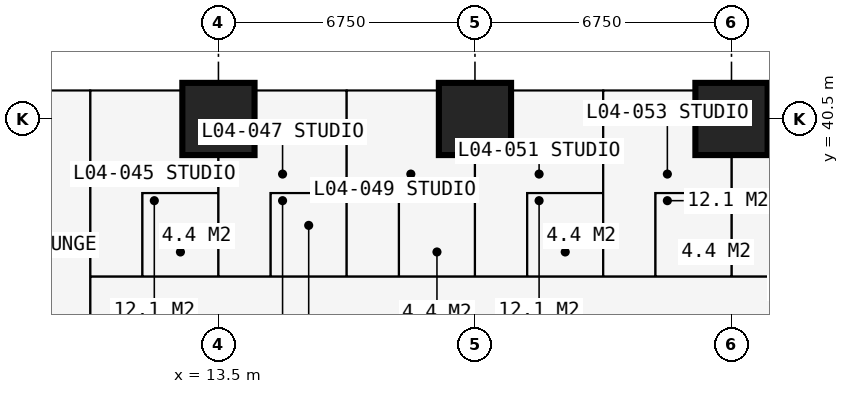
"""IFC4 building model, lengths in metres.
Left out: names, types, materials, properties, quantities, classifications, styles, units other than length and angle.
Written with IfcOpenShell. Run it as: python <this file> out.ifc"""

import sys

from ifc_helpers import new_model, si_unit, direction, frame, frame_2d, origin, origin_2d, place, context, subcontext, project, spatial, rectangle, extrude, element, fill, save


model = new_model("IFC4")
c1 = context("Model", 3, precision=1e-05, world=origin(), true_north=direction((0.0, 1.0)))
c2 = subcontext(c1, "Body", "Model", "MODEL_VIEW")
j1 = project(units=[si_unit("LENGTHUNIT", "METRE"), si_unit("PLANEANGLEUNIT", "RADIAN")], contexts=[c1])
p1 = place(None, origin())
s1 = spatial("IfcSite", under=j1, at=p1, CompositionType="ELEMENT")
p2 = place(p1, origin())
s2 = spatial("IfcBuilding", under=s1, at=p2, CompositionType="ELEMENT")
p3 = place(p2, frame((0.0, 0.0, 18.0)))
s3 = spatial("IfcBuildingStorey", under=s2, at=p3, CompositionType="ELEMENT", Elevation=18.0)
for number, where, z_axis, x_axis in (
    (1, (13.5, 40.5, 0.0), (0.0, 0.0, 1.0), (1.0, 0.0, 0.0)),
    (2, (20.25, 40.5, 0.0), (0.0, 0.0, 1.0), (1.0, 0.0, 0.0)),
    (3, (27.0, 40.5, 0.0), (0.0, 0.0, 1.0), (1.0, 0.0, 0.0)),
):
    element("IfcColumn", number, at=place(p3, frame(where, z_axis=z_axis, x_axis=x_axis)), inside=s3, PredefinedType="COLUMN", context=c2, shape_type="SweptSolid", body=[
        extrude(rectangle(XDim=1.9, YDim=1.9, at=origin_2d()), origin(), (0.0, 0.0, 1.0), 3.6),
    ])
p4 = place(p3, frame((13.5, 41.25, 0.0), z_axis=(0.0, 0.0, 1.0), x_axis=(1.0, 0.0, 0.0)))
e4 = element("IfcWall", 4, at=p4, inside=s3, PredefinedType="SOLIDWALL", context=c2, shape_type="SweptSolid", body=[
    extrude(rectangle(XDim=6.75, YDim=0.15, at=frame_2d((3.375, 0.0))), origin(), (0.0, 0.0, 1.0), 3.375),
])
p5 = place(p4, frame((0.996, 0.0, 0.0)))
e5 = element("IfcOpeningElement", 5, at=p5, cuts=e4, PredefinedType="OPENING", context=c2, shape_type="SweptSolid", body=[
    extrude(rectangle(XDim=1.0, YDim=2.2, at=frame_2d((0.5, 1.1))), frame((0.0, 0.085, 0.0), z_axis=(0.0, -1.0, 0.0), x_axis=(1.0, 0.0, 0.0)), (0.0, 0.0, 1.0), 0.17),
])
p6 = place(p4, frame((2.042, 0.0, 0.9)))
e6 = element("IfcOpeningElement", 6, at=p6, cuts=e4, PredefinedType="OPENING", context=c2, shape_type="SweptSolid", body=[
    extrude(rectangle(XDim=1.2, YDim=1.8, at=frame_2d((0.6, 0.9))), frame((0.0, 0.085, 0.0), z_axis=(0.0, -1.0, 0.0), x_axis=(1.0, 0.0, 0.0)), (0.0, 0.0, 1.0), 0.17),
])
p7 = place(p4, frame((4.754, 0.0, 0.0)))
e7 = element("IfcOpeningElement", 7, at=p7, cuts=e4, PredefinedType="OPENING", context=c2, shape_type="SweptSolid", body=[
    extrude(rectangle(XDim=1.0, YDim=2.2, at=frame_2d((0.5, 1.1))), frame((0.0, 0.085, 0.0), z_axis=(0.0, -1.0, 0.0), x_axis=(1.0, 0.0, 0.0)), (0.0, 0.0, 1.0), 0.17),
])
p8 = place(p4, frame((3.508, 0.0, 0.9)))
e8 = element("IfcOpeningElement", 8, at=p8, cuts=e4, PredefinedType="OPENING", context=c2, shape_type="SweptSolid", body=[
    extrude(rectangle(XDim=1.2, YDim=1.8, at=frame_2d((0.6, 0.9))), frame((0.0, 0.085, 0.0), z_axis=(0.0, -1.0, 0.0), x_axis=(1.0, 0.0, 0.0)), (0.0, 0.0, 1.0), 0.17),
])
p9 = place(p3, frame((16.875, 41.35, 0.0), z_axis=(0.0, 0.0, 1.0), x_axis=(0.0, 1.0, 0.0)))
e9 = element("IfcWall", 9, at=p9, inside=s3, PredefinedType="USERDEFINED", context=c2, shape_type="SweptSolid", body=[
    extrude(rectangle(XDim=2.2, YDim=1.0, at=frame_2d((1.1, 0.0))), origin(), (0.0, 0.0, 1.0), 0.9),
])
p10 = place(p3, frame((10.125, 30.375, 0.0), z_axis=(0.0, 0.0, 1.0), x_axis=(0.0, 1.0, 0.0)))
e10 = element("IfcWall", 10, at=p10, inside=s3, PredefinedType="PARTITIONING", context=c2, shape_type="SweptSolid", body=[
    extrude(rectangle(XDim=10.859, YDim=0.15, at=frame_2d((5.429, 0.0))), origin(), (0.0, 0.0, 1.0), 3.375),
])
p11 = place(p10, frame((4.725, 0.0, 0.0)))
e11 = element("IfcOpeningElement", 11, at=p11, cuts=e10, PredefinedType="OPENING", context=c2, shape_type="SweptSolid", body=[
    extrude(rectangle(XDim=1.0, YDim=2.2, at=frame_2d((0.5, 1.1))), frame((0.0, 0.085, 0.0), z_axis=(0.0, -1.0, 0.0), x_axis=(1.0, 0.0, 0.0)), (0.0, 0.0, 1.0), 0.17),
])
p12 = place(p3, frame((10.125, 36.35, 0.0), z_axis=(0.0, 0.0, 1.0), x_axis=(1.0, 0.0, 0.0)))
e12 = element("IfcWall", 12, at=p12, inside=s3, PredefinedType="PARTITIONING", context=c2, shape_type="SweptSolid", body=[
    extrude(rectangle(XDim=23.625, YDim=0.1, at=frame_2d((11.812, 0.0))), origin(), (0.0, 0.0, 1.0), 3.375),
])
p13 = place(p12, frame((0.2, 0.0, 0.0)))
e13 = element("IfcOpeningElement", 13, at=p13, cuts=e12, PredefinedType="OPENING", context=c2, shape_type="SweptSolid", body=[
    extrude(rectangle(XDim=0.95, YDim=2.2, at=frame_2d((0.475, 1.1))), frame((0.0, 0.06, 0.0), z_axis=(0.0, -1.0, 0.0), x_axis=(1.0, 0.0, 0.0)), (0.0, 0.0, 1.0), 0.12),
])
p14 = place(p12, frame((3.625, 0.0, 0.0)))
e14 = element("IfcOpeningElement", 14, at=p14, cuts=e12, PredefinedType="OPENING", context=c2, shape_type="SweptSolid", body=[
    extrude(rectangle(XDim=0.95, YDim=2.2, at=frame_2d((0.475, 1.1))), frame((0.0, 0.06, 0.0), z_axis=(0.0, -1.0, 0.0), x_axis=(1.0, 0.0, 0.0)), (0.0, 0.0, 1.0), 0.12),
])
p15 = place(p12, frame((7.0, 0.0, 0.0)))
e15 = element("IfcOpeningElement", 15, at=p15, cuts=e12, PredefinedType="OPENING", context=c2, shape_type="SweptSolid", body=[
    extrude(rectangle(XDim=0.95, YDim=2.2, at=frame_2d((0.475, 1.1))), frame((0.0, 0.06, 0.0), z_axis=(0.0, -1.0, 0.0), x_axis=(1.0, 0.0, 0.0)), (0.0, 0.0, 1.0), 0.12),
])
p16 = place(p12, frame((10.375, 0.0, 0.0)))
e16 = element("IfcOpeningElement", 16, at=p16, cuts=e12, PredefinedType="OPENING", context=c2, shape_type="SweptSolid", body=[
    extrude(rectangle(XDim=0.95, YDim=2.2, at=frame_2d((0.475, 1.1))), frame((0.0, 0.06, 0.0), z_axis=(0.0, -1.0, 0.0), x_axis=(1.0, 0.0, 0.0)), (0.0, 0.0, 1.0), 0.12),
])
p17 = place(p12, frame((13.75, 0.0, 0.0)))
e17 = element("IfcOpeningElement", 17, at=p17, cuts=e12, PredefinedType="OPENING", context=c2, shape_type="SweptSolid", body=[
    extrude(rectangle(XDim=0.95, YDim=2.2, at=frame_2d((0.475, 1.1))), frame((0.0, 0.06, 0.0), z_axis=(0.0, -1.0, 0.0), x_axis=(1.0, 0.0, 0.0)), (0.0, 0.0, 1.0), 0.12),
])
p18 = place(p3, frame((11.5, 36.35, 0.0), z_axis=(0.0, 0.0, 1.0), x_axis=(0.0, 1.0, 0.0)))
e18 = element("IfcWall", 18, at=p18, inside=s3, PredefinedType="PARTITIONING", context=c2, shape_type="SweptSolid", body=[
    extrude(rectangle(XDim=2.2, YDim=0.1, at=frame_2d((1.1, 0.0))), origin(), (0.0, 0.0, 1.0), 3.375),
])
p19 = place(p18, frame((0.65, 0.0, 0.0)))
e19 = element("IfcOpeningElement", 19, at=p19, cuts=e18, PredefinedType="OPENING", context=c2, shape_type="SweptSolid", body=[
    extrude(rectangle(XDim=0.9, YDim=2.2, at=frame_2d((0.45, 1.1))), frame((0.0, 0.06, 0.0), z_axis=(0.0, -1.0, 0.0), x_axis=(1.0, 0.0, 0.0)), (0.0, 0.0, 1.0), 0.12),
])
p20 = place(p3, frame((11.5, 38.55, 0.0), z_axis=(0.0, 0.0, 1.0), x_axis=(1.0, 0.0, 0.0)))
e20 = element("IfcWall", 20, at=p20, inside=s3, PredefinedType="PARTITIONING", context=c2, shape_type="SweptSolid", body=[
    extrude(rectangle(XDim=2.0, YDim=0.1, at=frame_2d((1.0, 0.0))), origin(), (0.0, 0.0, 1.0), 3.375),
])
p21 = place(p3, frame((13.5, 36.35, 0.0), z_axis=(0.0, 0.0, 1.0), x_axis=(0.0, 1.0, 0.0)))
e21 = element("IfcWall", 21, at=p21, inside=s3, PredefinedType="PARTITIONING", context=c2, shape_type="SweptSolid", body=[
    extrude(rectangle(XDim=4.884, YDim=0.175, at=frame_2d((2.442, 0.0))), origin(), (0.0, 0.0, 1.0), 2.877),
])
p22 = place(p3, frame((14.875, 36.35, 0.0), z_axis=(0.0, 0.0, 1.0), x_axis=(0.0, 1.0, 0.0)))
e22 = element("IfcWall", 22, at=p22, inside=s3, PredefinedType="PARTITIONING", context=c2, shape_type="SweptSolid", body=[
    extrude(rectangle(XDim=2.2, YDim=0.1, at=frame_2d((1.1, 0.0))), origin(), (0.0, 0.0, 1.0), 3.375),
])
p23 = place(p22, frame((0.65, 0.0, 0.0)))
e23 = element("IfcOpeningElement", 23, at=p23, cuts=e22, PredefinedType="OPENING", context=c2, shape_type="SweptSolid", body=[
    extrude(rectangle(XDim=0.9, YDim=2.2, at=frame_2d((0.45, 1.1))), frame((0.0, 0.06, 0.0), z_axis=(0.0, -1.0, 0.0), x_axis=(1.0, 0.0, 0.0)), (0.0, 0.0, 1.0), 0.12),
])
p24 = place(p3, frame((14.875, 38.55, 0.0), z_axis=(0.0, 0.0, 1.0), x_axis=(1.0, 0.0, 0.0)))
e24 = element("IfcWall", 24, at=p24, inside=s3, PredefinedType="PARTITIONING", context=c2, shape_type="SweptSolid", body=[
    extrude(rectangle(XDim=2.0, YDim=0.1, at=frame_2d((1.0, 0.0))), origin(), (0.0, 0.0, 1.0), 3.375),
])
p25 = place(p3, frame((16.875, 36.35, 0.0), z_axis=(0.0, 0.0, 1.0), x_axis=(0.0, 1.0, 0.0)))
e25 = element("IfcWall", 25, at=p25, inside=s3, PredefinedType="PARTITIONING", context=c2, shape_type="SweptSolid", body=[
    extrude(rectangle(XDim=4.884, YDim=0.175, at=frame_2d((2.442, 0.0))), origin(), (0.0, 0.0, 1.0), 3.375),
])
p26 = place(p3, frame((18.25, 36.35, 0.0), z_axis=(0.0, 0.0, 1.0), x_axis=(0.0, 1.0, 0.0)))
e26 = element("IfcWall", 26, at=p26, inside=s3, PredefinedType="PARTITIONING", context=c2, shape_type="SweptSolid", body=[
    extrude(rectangle(XDim=2.2, YDim=0.1, at=frame_2d((1.1, 0.0))), origin(), (0.0, 0.0, 1.0), 3.375),
])
p27 = place(p26, frame((0.65, 0.0, 0.0)))
e27 = element("IfcOpeningElement", 27, at=p27, cuts=e26, PredefinedType="OPENING", context=c2, shape_type="SweptSolid", body=[
    extrude(rectangle(XDim=0.9, YDim=2.2, at=frame_2d((0.45, 1.1))), frame((0.0, 0.06, 0.0), z_axis=(0.0, -1.0, 0.0), x_axis=(1.0, 0.0, 0.0)), (0.0, 0.0, 1.0), 0.12),
])
p28 = place(p3, frame((18.25, 38.55, 0.0), z_axis=(0.0, 0.0, 1.0), x_axis=(1.0, 0.0, 0.0)))
e28 = element("IfcWall", 28, at=p28, inside=s3, PredefinedType="PARTITIONING", context=c2, shape_type="SweptSolid", body=[
    extrude(rectangle(XDim=2.0, YDim=0.1, at=frame_2d((1.0, 0.0))), origin(), (0.0, 0.0, 1.0), 3.375),
])
p29 = place(p3, frame((20.25, 36.35, 0.0), z_axis=(0.0, 0.0, 1.0), x_axis=(0.0, 1.0, 0.0)))
e29 = element("IfcWall", 29, at=p29, inside=s3, PredefinedType="PARTITIONING", context=c2, shape_type="SweptSolid", body=[
    extrude(rectangle(XDim=4.884, YDim=0.175, at=frame_2d((2.442, 0.0))), origin(), (0.0, 0.0, 1.0), 2.61),
])
p30 = place(p3, frame((21.625, 36.35, 0.0), z_axis=(0.0, 0.0, 1.0), x_axis=(0.0, 1.0, 0.0)))
e30 = element("IfcWall", 30, at=p30, inside=s3, PredefinedType="PARTITIONING", context=c2, shape_type="SweptSolid", body=[
    extrude(rectangle(XDim=2.2, YDim=0.1, at=frame_2d((1.1, 0.0))), origin(), (0.0, 0.0, 1.0), 3.375),
])
p31 = place(p30, frame((0.65, 0.0, 0.0)))
e31 = element("IfcOpeningElement", 31, at=p31, cuts=e30, PredefinedType="OPENING", context=c2, shape_type="SweptSolid", body=[
    extrude(rectangle(XDim=0.9, YDim=2.2, at=frame_2d((0.45, 1.1))), frame((0.0, 0.06, 0.0), z_axis=(0.0, -1.0, 0.0), x_axis=(1.0, 0.0, 0.0)), (0.0, 0.0, 1.0), 0.12),
])
p32 = place(p3, frame((21.625, 38.55, 0.0), z_axis=(0.0, 0.0, 1.0), x_axis=(1.0, 0.0, 0.0)))
e32 = element("IfcWall", 32, at=p32, inside=s3, PredefinedType="PARTITIONING", context=c2, shape_type="SweptSolid", body=[
    extrude(rectangle(XDim=2.0, YDim=0.1, at=frame_2d((1.0, 0.0))), origin(), (0.0, 0.0, 1.0), 3.375),
])
p33 = place(p3, frame((23.625, 36.35, 0.0), z_axis=(0.0, 0.0, 1.0), x_axis=(0.0, 1.0, 0.0)))
e33 = element("IfcWall", 33, at=p33, inside=s3, PredefinedType="PARTITIONING", context=c2, shape_type="SweptSolid", body=[
    extrude(rectangle(XDim=4.884, YDim=0.175, at=frame_2d((2.442, 0.0))), origin(), (0.0, 0.0, 1.0), 3.375),
])
p34 = place(p3, frame((25.0, 36.35, 0.0), z_axis=(0.0, 0.0, 1.0), x_axis=(0.0, 1.0, 0.0)))
e34 = element("IfcWall", 34, at=p34, inside=s3, PredefinedType="PARTITIONING", context=c2, shape_type="SweptSolid", body=[
    extrude(rectangle(XDim=2.2, YDim=0.1, at=frame_2d((1.1, 0.0))), origin(), (0.0, 0.0, 1.0), 3.375),
])
p35 = place(p34, frame((0.65, 0.0, 0.0)))
e35 = element("IfcOpeningElement", 35, at=p35, cuts=e34, PredefinedType="OPENING", context=c2, shape_type="SweptSolid", body=[
    extrude(rectangle(XDim=0.9, YDim=2.2, at=frame_2d((0.45, 1.1))), frame((0.0, 0.06, 0.0), z_axis=(0.0, -1.0, 0.0), x_axis=(1.0, 0.0, 0.0)), (0.0, 0.0, 1.0), 0.12),
])
p36 = place(p3, frame((25.0, 38.55, 0.0), z_axis=(0.0, 0.0, 1.0), x_axis=(1.0, 0.0, 0.0)))
e36 = element("IfcWall", 36, at=p36, inside=s3, PredefinedType="PARTITIONING", context=c2, shape_type="SweptSolid", body=[
    extrude(rectangle(XDim=2.0, YDim=0.1, at=frame_2d((1.0, 0.0))), origin(), (0.0, 0.0, 1.0), 3.375),
])
p37 = place(p3, frame((27.0, 36.35, 0.0), z_axis=(0.0, 0.0, 1.0), x_axis=(0.0, 1.0, 0.0)))
e37 = element("IfcWall", 37, at=p37, inside=s3, PredefinedType="PARTITIONING", context=c2, shape_type="SweptSolid", body=[
    extrude(rectangle(XDim=4.884, YDim=0.15, at=frame_2d((2.442, 0.0))), origin(), (0.0, 0.0, 1.0), 2.61),
])
p38 = place(p5, origin())
e38 = element("IfcDoor", 38, at=p38, inside=s3, OperationType="SINGLE_SWING_LEFT", PredefinedType="DOOR", context=c2, shape_type="SweptSolid", body=[
    extrude(rectangle(XDim=1.0, YDim=2.2, at=frame_2d((0.5, 1.1))), frame((0.0, 0.025, 0.0), z_axis=(0.0, -1.0, 0.0), x_axis=(1.0, 0.0, 0.0)), (0.0, 0.0, 1.0), 0.05),
])
fill(e5, e38)
p39 = place(p6, origin())
e39 = element("IfcWindow", 39, at=p39, inside=s3, PartitioningType="SINGLE_PANEL", PredefinedType="WINDOW", context=c2, shape_type="SweptSolid", body=[
    extrude(rectangle(XDim=1.2, YDim=1.8, at=frame_2d((0.6, 0.9))), frame((0.0, 0.03, 0.0), z_axis=(0.0, -1.0, 0.0), x_axis=(1.0, 0.0, 0.0)), (0.0, 0.0, 1.0), 0.06),
])
fill(e6, e39)
p40 = place(p7, origin())
e40 = element("IfcDoor", 40, at=p40, inside=s3, OperationType="SINGLE_SWING_RIGHT", PredefinedType="DOOR", context=c2, shape_type="SweptSolid", body=[
    extrude(rectangle(XDim=1.0, YDim=2.2, at=frame_2d((0.5, 1.1))), frame((0.0, 0.025, 0.0), z_axis=(0.0, -1.0, 0.0), x_axis=(1.0, 0.0, 0.0)), (0.0, 0.0, 1.0), 0.05),
])
fill(e7, e40)
p41 = place(p8, origin())
e41 = element("IfcWindow", 41, at=p41, inside=s3, PartitioningType="SINGLE_PANEL", PredefinedType="WINDOW", context=c2, shape_type="SweptSolid", body=[
    extrude(rectangle(XDim=1.2, YDim=1.8, at=frame_2d((0.6, 0.9))), frame((0.0, 0.03, 0.0), z_axis=(0.0, -1.0, 0.0), x_axis=(1.0, 0.0, 0.0)), (0.0, 0.0, 1.0), 0.06),
])
fill(e8, e41)
p42 = place(p13, origin())
e42 = element("IfcDoor", 42, at=p42, inside=s3, OperationType="SINGLE_SWING_LEFT", PredefinedType="DOOR", context=c2, shape_type="SweptSolid", body=[
    extrude(rectangle(XDim=0.95, YDim=2.2, at=frame_2d((0.475, 1.1))), frame((0.0, 0.025, 0.0), z_axis=(0.0, -1.0, 0.0), x_axis=(1.0, 0.0, 0.0)), (0.0, 0.0, 1.0), 0.05),
])
fill(e13, e42)
p43 = place(p19, origin())
e43 = element("IfcDoor", 43, at=p43, inside=s3, OperationType="SINGLE_SWING_RIGHT", PredefinedType="DOOR", context=c2, shape_type="SweptSolid", body=[
    extrude(rectangle(XDim=0.9, YDim=2.2, at=frame_2d((0.45, 1.1))), frame((0.0, 0.025, 0.0), z_axis=(0.0, -1.0, 0.0), x_axis=(1.0, 0.0, 0.0)), (0.0, 0.0, 1.0), 0.05),
])
fill(e19, e43)
p44 = place(p14, origin())
e44 = element("IfcDoor", 44, at=p44, inside=s3, OperationType="SINGLE_SWING_LEFT", PredefinedType="DOOR", context=c2, shape_type="SweptSolid", body=[
    extrude(rectangle(XDim=0.95, YDim=2.2, at=frame_2d((0.475, 1.1))), frame((0.0, 0.025, 0.0), z_axis=(0.0, -1.0, 0.0), x_axis=(1.0, 0.0, 0.0)), (0.0, 0.0, 1.0), 0.05),
])
fill(e14, e44)
p45 = place(p23, origin())
e45 = element("IfcDoor", 45, at=p45, inside=s3, OperationType="SINGLE_SWING_RIGHT", PredefinedType="DOOR", context=c2, shape_type="SweptSolid", body=[
    extrude(rectangle(XDim=0.9, YDim=2.2, at=frame_2d((0.45, 1.1))), frame((0.0, 0.025, 0.0), z_axis=(0.0, -1.0, 0.0), x_axis=(1.0, 0.0, 0.0)), (0.0, 0.0, 1.0), 0.05),
])
fill(e23, e45)
p46 = place(p15, origin())
e46 = element("IfcDoor", 46, at=p46, inside=s3, OperationType="SINGLE_SWING_LEFT", PredefinedType="DOOR", context=c2, shape_type="SweptSolid", body=[
    extrude(rectangle(XDim=0.95, YDim=2.2, at=frame_2d((0.475, 1.1))), frame((0.0, 0.025, 0.0), z_axis=(0.0, -1.0, 0.0), x_axis=(1.0, 0.0, 0.0)), (0.0, 0.0, 1.0), 0.05),
])
fill(e15, e46)
p47 = place(p27, origin())
e47 = element("IfcDoor", 47, at=p47, inside=s3, OperationType="SINGLE_SWING_RIGHT", PredefinedType="DOOR", context=c2, shape_type="SweptSolid", body=[
    extrude(rectangle(XDim=0.9, YDim=2.2, at=frame_2d((0.45, 1.1))), frame((0.0, 0.025, 0.0), z_axis=(0.0, -1.0, 0.0), x_axis=(1.0, 0.0, 0.0)), (0.0, 0.0, 1.0), 0.05),
])
fill(e27, e47)
p48 = place(p16, origin())
e48 = element("IfcDoor", 48, at=p48, inside=s3, OperationType="SINGLE_SWING_LEFT", PredefinedType="DOOR", context=c2, shape_type="SweptSolid", body=[
    extrude(rectangle(XDim=0.95, YDim=2.2, at=frame_2d((0.475, 1.1))), frame((0.0, 0.025, 0.0), z_axis=(0.0, -1.0, 0.0), x_axis=(1.0, 0.0, 0.0)), (0.0, 0.0, 1.0), 0.05),
])
fill(e16, e48)
p49 = place(p31, origin())
e49 = element("IfcDoor", 49, at=p49, inside=s3, OperationType="SINGLE_SWING_RIGHT", PredefinedType="DOOR", context=c2, shape_type="SweptSolid", body=[
    extrude(rectangle(XDim=0.9, YDim=2.2, at=frame_2d((0.45, 1.1))), frame((0.0, 0.025, 0.0), z_axis=(0.0, -1.0, 0.0), x_axis=(1.0, 0.0, 0.0)), (0.0, 0.0, 1.0), 0.05),
])
fill(e31, e49)
p50 = place(p17, origin())
e50 = element("IfcDoor", 50, at=p50, inside=s3, OperationType="SINGLE_SWING_LEFT", PredefinedType="DOOR", context=c2, shape_type="SweptSolid", body=[
    extrude(rectangle(XDim=0.95, YDim=2.2, at=frame_2d((0.475, 1.1))), frame((0.0, 0.025, 0.0), z_axis=(0.0, -1.0, 0.0), x_axis=(1.0, 0.0, 0.0)), (0.0, 0.0, 1.0), 0.05),
])
fill(e17, e50)
p51 = place(p35, origin())
e51 = element("IfcDoor", 51, at=p51, inside=s3, OperationType="SINGLE_SWING_RIGHT", PredefinedType="DOOR", context=c2, shape_type="SweptSolid", body=[
    extrude(rectangle(XDim=0.9, YDim=2.2, at=frame_2d((0.45, 1.1))), frame((0.0, 0.025, 0.0), z_axis=(0.0, -1.0, 0.0), x_axis=(1.0, 0.0, 0.0)), (0.0, 0.0, 1.0), 0.05),
])
fill(e35, e51)
p52 = place(p11, origin())
e52 = element("IfcDoor", 52, at=p52, inside=s3, OperationType="SINGLE_SWING_LEFT", PredefinedType="DOOR", context=c2, shape_type="SweptSolid", body=[
    extrude(rectangle(XDim=1.0, YDim=2.2, at=frame_2d((0.5, 1.1))), frame((0.0, 0.025, 0.0), z_axis=(0.0, -1.0, 0.0), x_axis=(1.0, 0.0, 0.0)), (0.0, 0.0, 1.0), 0.05),
])
fill(e11, e52)
save(model, sys.argv[1])
